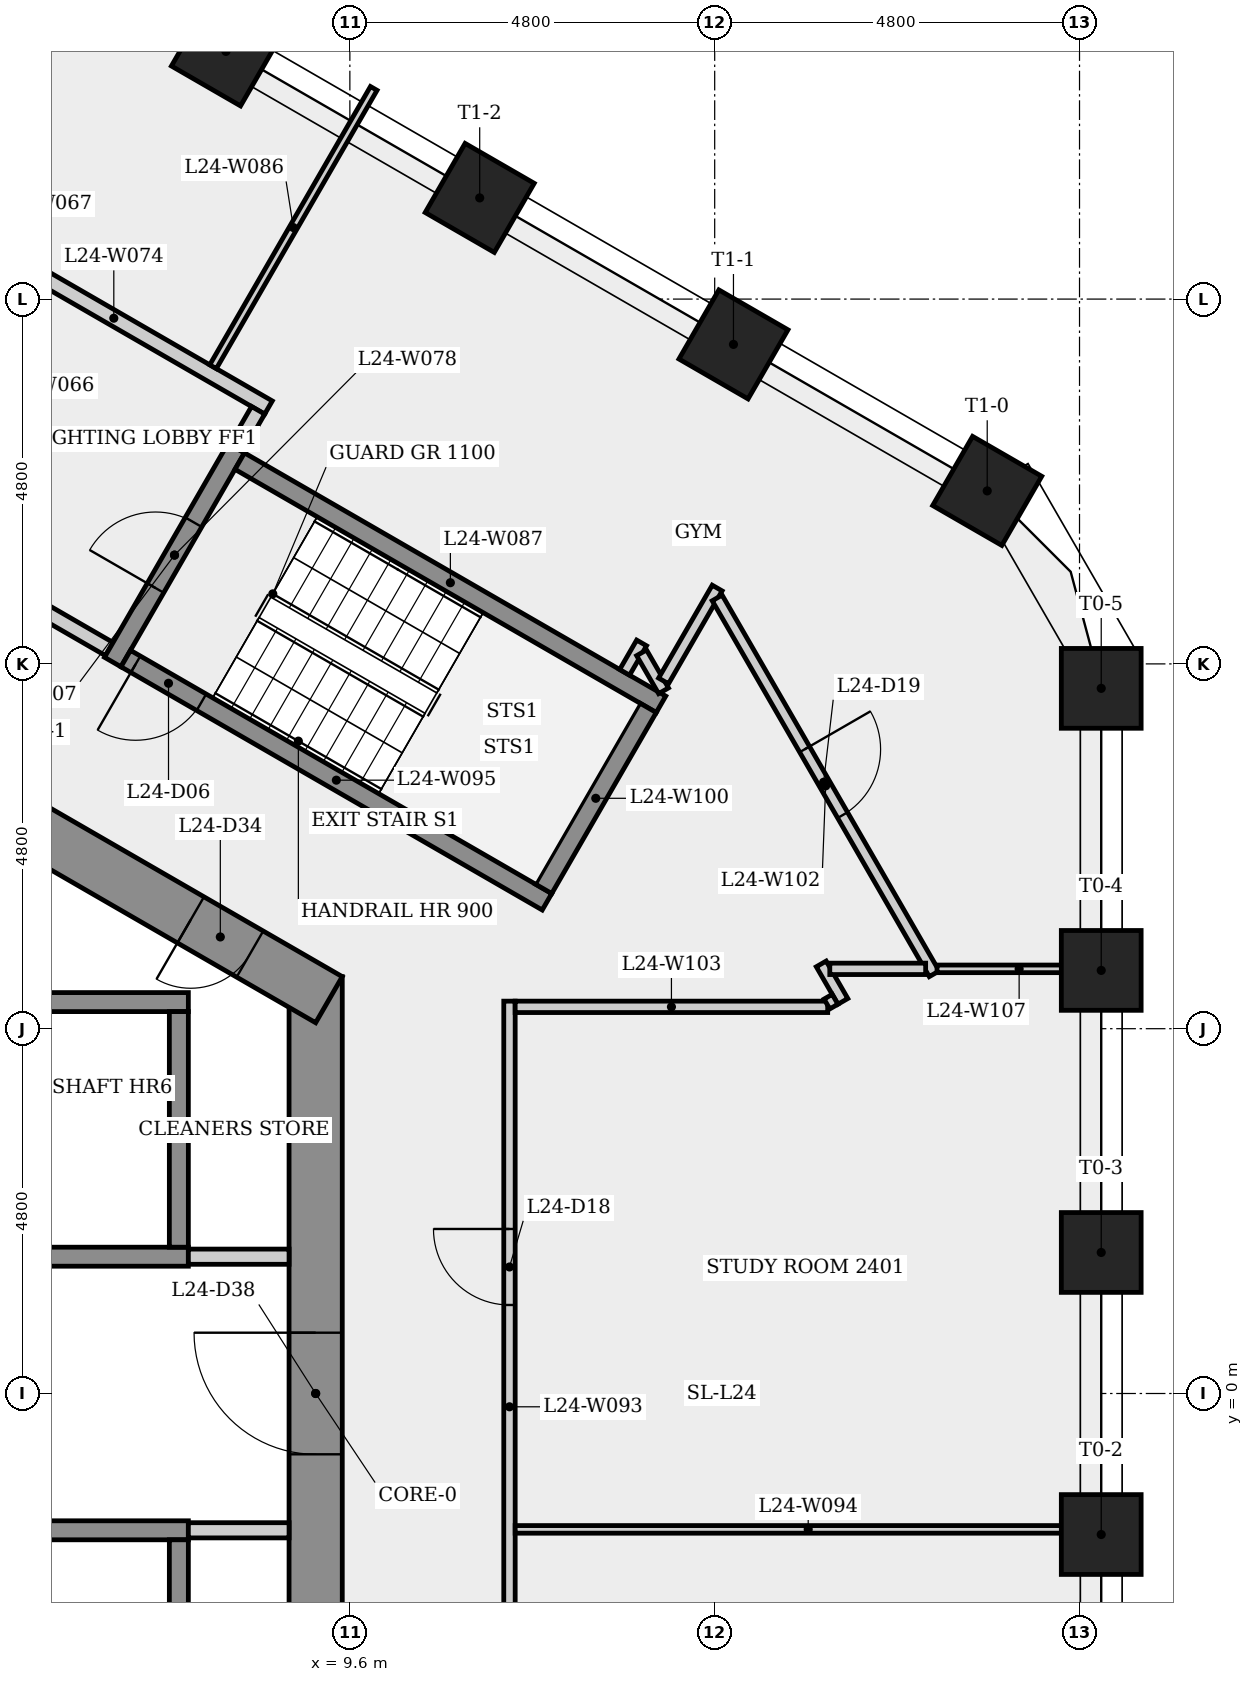
"""IFC4 building model, lengths in metres.
Left out: names, types, materials, properties, quantities, classifications, styles, units other than length and angle.
Written with IfcOpenShell. Run it as: python <this file> out.ifc"""

import sys

from ifc_helpers import new_model, si_unit, direction, frame, frame_2d, origin, origin_2d, place, context, subcontext, project, spatial, rectangle, extrude, element, fill, save


model = new_model("IFC4")
c1 = context("Model", 3, precision=1e-05, world=origin(), true_north=direction((0.0, 1.0)))
c2 = subcontext(c1, "Body", "Model", "MODEL_VIEW")
j1 = project(units=[si_unit("LENGTHUNIT", "METRE"), si_unit("PLANEANGLEUNIT", "RADIAN")], contexts=[c1])
p1 = place(None, origin())
s1 = spatial("IfcSite", under=j1, at=p1, CompositionType="ELEMENT")
p2 = place(p1, origin())
s2 = spatial("IfcBuilding", under=s1, at=p2, CompositionType="ELEMENT")
p3 = place(p2, frame((0.0, 0.0, 93.3)))
s3 = spatial("IfcBuildingStorey", under=s2, at=p3, CompositionType="ELEMENT", Elevation=93.3)
p4 = place(p3, frame((9.15, -5.485, 0.0), z_axis=(0.0, 0.0, 1.0), x_axis=(0.0, 1.0, 0.0)))
e1 = element("IfcWall", 1, at=p4, inside=s3, PredefinedType="SHEAR", context=c2, shape_type="SweptSolid", body=[
    extrude(rectangle(XDim=10.97, YDim=0.7, at=frame_2d((5.485, 0.0))), origin(), (0.0, 0.0, 1.0), 3.4),
])
p5 = place(p4, frame((4.685, 0.0, 0.0)))
e2 = element("IfcOpeningElement", 2, at=p5, cuts=e1, PredefinedType="OPENING", context=c2, shape_type="SweptSolid", body=[
    extrude(rectangle(XDim=1.6, YDim=2.1, at=frame_2d((0.8, 1.05))), frame((0.0, 0.36, 0.0), z_axis=(0.0, -1.0, 0.0), x_axis=(1.0, 0.0, 0.0)), (0.0, 0.0, 1.0), 0.72),
])
p6 = place(p3, frame((9.325, 5.182, 0.0), z_axis=(0.0, 0.0, 1.0), x_axis=(-0.866023993627, 0.500002442456, 0.0)))
e3 = element("IfcWall", 3, at=p6, inside=s3, PredefinedType="SHEAR", context=c2, shape_type="SweptSolid", body=[
    extrude(rectangle(XDim=10.97, YDim=0.7, at=frame_2d((5.485, 0.0))), origin(), (0.0, 0.0, 1.0), 3.4),
])
p7 = place(p6, frame((7.46, 0.0, 0.0)))
e4 = element("IfcOpeningElement", 4, at=p7, cuts=e3, PredefinedType="OPENING", context=c2, shape_type="SweptSolid", body=[
    extrude(rectangle(XDim=0.9, YDim=2.1, at=frame_2d((0.45, 1.05))), frame((0.0, 0.36, 0.0), z_axis=(0.0, -1.0, 0.0), x_axis=(1.0, 0.0, 0.0)), (0.0, 0.0, 1.0), 0.72),
])
p8 = place(p6, frame((1.201, 0.0, 0.0)))
e5 = element("IfcOpeningElement", 5, at=p8, cuts=e3, PredefinedType="OPENING", context=c2, shape_type="SweptSolid", body=[
    extrude(rectangle(XDim=0.9, YDim=2.1, at=frame_2d((0.45, 1.05))), frame((0.0, 0.36, 0.0), z_axis=(0.0, -1.0, 0.0), x_axis=(1.0, 0.0, 0.0)), (0.0, 0.0, 1.0), 0.72),
])
for number, where, z_axis, x_axis in (
    (6, (19.486, -1.856, 0.0), (0.0, 0.0, 1.0), (1.0, 0.0, 0.0)),
    (7, (19.486, 1.856, 0.0), (0.0, 0.0, 1.0), (1.0, 0.0, 0.0)),
    (8, (19.486, 5.567, 0.0), (0.0, 0.0, 1.0), (1.0, 0.0, 0.0)),
    (9, (19.486, 9.278, 0.0), (0.0, 0.0, 1.0), (1.0, 0.0, 0.0)),
    (10, (17.986, 11.876, 0.0), (0.0, 0.0, 1.0), (0.5, 0.866, 0.0)),
    (11, (14.647, 13.804, 0.0), (0.0, 0.0, 1.0), (0.5, 0.866, 0.0)),
    (12, (11.308, 15.731, 0.0), (0.0, 0.0, 1.0), (0.5, 0.866, 0.0)),
    (13, (7.969, 17.659, 0.0), (0.0, 0.0, 1.0), (0.5, 0.866, 0.0)),
):
    element("IfcColumn", number, at=place(p3, frame(where, z_axis=z_axis, x_axis=x_axis)), inside=s3, PredefinedType="COLUMN", context=c2, shape_type="SweptSolid", body=[
        extrude(rectangle(XDim=1.05, YDim=1.05, at=origin_2d()), origin(), (0.0, 0.0, 1.0), 3.4),
    ])
p9 = place(p3, frame((-7.475, 1.8, 0.0), z_axis=(0.0, 0.0, 1.0), x_axis=(1.0, 0.0, 0.0)))
e14 = element("IfcWall", 14, at=p9, inside=s3, PredefinedType="SHEAR", context=c2, shape_type="SweptSolid", body=[
    extrude(rectangle(XDim=14.95, YDim=0.25, at=frame_2d((7.475, 0.0))), origin(), (0.0, 0.0, 1.0), 3.05),
])
p10 = place(p3, frame((-7.225, 5.15, 0.0), z_axis=(0.0, 0.0, 1.0), x_axis=(1.0, 0.0, 0.0)))
e15 = element("IfcWall", 15, at=p10, inside=s3, PredefinedType="SHEAR", context=c2, shape_type="SweptSolid", body=[
    extrude(rectangle(XDim=14.7, YDim=0.25, at=frame_2d((7.35, 0.0))), origin(), (0.0, 0.0, 1.0), 3.05),
])
p11 = place(p3, frame((-7.225, -1.8, 0.0), z_axis=(0.0, 0.0, 1.0), x_axis=(1.0, 0.0, 0.0)))
e16 = element("IfcWall", 16, at=p11, inside=s3, PredefinedType="SHEAR", context=c2, shape_type="SweptSolid", body=[
    extrude(rectangle(XDim=14.7, YDim=0.25, at=frame_2d((7.35, 0.0))), origin(), (0.0, 0.0, 1.0), 3.05),
])
p12 = place(p11, frame((0.597, 0.0, 0.0)))
e17 = element("IfcOpeningElement", 17, at=p12, cuts=e16, PredefinedType="OPENING", context=c2, shape_type="SweptSolid", body=[
    extrude(rectangle(XDim=1.1, YDim=2.1, at=frame_2d((0.55, 1.05))), frame((0.0, 0.135, 0.0), z_axis=(0.0, -1.0, 0.0), x_axis=(1.0, 0.0, 0.0)), (0.0, 0.0, 1.0), 0.27),
])
p13 = place(p11, frame((3.0, 0.0, 0.0)))
e18 = element("IfcOpeningElement", 18, at=p13, cuts=e16, PredefinedType="OPENING", context=c2, shape_type="SweptSolid", body=[
    extrude(rectangle(XDim=1.1, YDim=2.1, at=frame_2d((0.55, 1.05))), frame((0.0, 0.135, 0.0), z_axis=(0.0, -1.0, 0.0), x_axis=(1.0, 0.0, 0.0)), (0.0, 0.0, 1.0), 0.27),
])
p14 = place(p11, frame((5.45, 0.0, 0.0)))
e19 = element("IfcOpeningElement", 19, at=p14, cuts=e16, PredefinedType="OPENING", context=c2, shape_type="SweptSolid", body=[
    extrude(rectangle(XDim=1.1, YDim=2.1, at=frame_2d((0.55, 1.05))), frame((0.0, 0.135, 0.0), z_axis=(0.0, -1.0, 0.0), x_axis=(1.0, 0.0, 0.0)), (0.0, 0.0, 1.0), 0.27),
])
p15 = place(p11, frame((7.9, 0.0, 0.0)))
e20 = element("IfcOpeningElement", 20, at=p15, cuts=e16, PredefinedType="OPENING", context=c2, shape_type="SweptSolid", body=[
    extrude(rectangle(XDim=1.1, YDim=2.1, at=frame_2d((0.55, 1.05))), frame((0.0, 0.135, 0.0), z_axis=(0.0, -1.0, 0.0), x_axis=(1.0, 0.0, 0.0)), (0.0, 0.0, 1.0), 0.27),
])
p16 = place(p11, frame((10.35, 0.0, 0.0)))
e21 = element("IfcOpeningElement", 21, at=p16, cuts=e16, PredefinedType="OPENING", context=c2, shape_type="SweptSolid", body=[
    extrude(rectangle(XDim=1.1, YDim=2.1, at=frame_2d((0.55, 1.05))), frame((0.0, 0.135, 0.0), z_axis=(0.0, -1.0, 0.0), x_axis=(1.0, 0.0, 0.0)), (0.0, 0.0, 1.0), 0.27),
])
p17 = place(p3, frame((4.459, 15.323, 0.0), z_axis=(0.0, 0.0, 1.0), x_axis=(0.866016039709, -0.500016218704, 0.0)))
e22 = element("IfcWall", 22, at=p17, inside=s3, PredefinedType="PARTITIONING", context=c2, shape_type="SweptSolid", body=[
    extrude(rectangle(XDim=4.7, YDim=0.2, at=frame_2d((2.35, 0.0))), origin(), (0.0, 0.0, 1.0), 3.05),
])
p18 = place(p3, frame((6.435, 9.795, 0.0), z_axis=(0.0, 0.0, 1.0), x_axis=(-0.866012907634, 0.500021643343, 0.0)))
e23 = element("IfcWall", 23, at=p18, inside=s3, PredefinedType="PARTITIONING", context=c2, shape_type="SweptSolid", body=[
    extrude(rectangle(XDim=4.45, YDim=0.2, at=frame_2d((2.225, 0.0))), origin(), (0.0, 0.0, 1.0), 3.05),
])
p19 = place(p18, frame((1.675, 0.0, 0.0)))
e24 = element("IfcOpeningElement", 24, at=p19, cuts=e23, PredefinedType="OPENING", context=c2, shape_type="SweptSolid", body=[
    extrude(rectangle(XDim=1.1, YDim=2.1, at=frame_2d((0.55, 1.05))), frame((0.0, 0.11, 0.0), z_axis=(0.0, -1.0, 0.0), x_axis=(1.0, 0.0, 0.0)), (0.0, 0.0, 1.0), 0.22),
])
p20 = place(p3, frame((6.48, 9.624, 0.0), z_axis=(0.0, 0.0, 1.0), x_axis=(0.500017246033, 0.866015446554, 0.0)))
e25 = element("IfcWall", 25, at=p20, inside=s3, PredefinedType="SHEAR", context=c2, shape_type="SweptSolid", body=[
    extrude(rectangle(XDim=3.25, YDim=0.25, at=frame_2d((1.625, 0.0))), origin(), (0.0, 0.0, 1.0), 3.05),
])
p21 = place(p20, frame((1.125, 0.0, 0.0)))
e26 = element("IfcOpeningElement", 26, at=p21, cuts=e25, PredefinedType="OPENING", context=c2, shape_type="SweptSolid", body=[
    extrude(rectangle(XDim=1.0, YDim=2.1, at=frame_2d((0.5, 1.05))), frame((0.0, 0.135, 0.0), z_axis=(0.0, -1.0, 0.0), x_axis=(1.0, 0.0, 0.0)), (0.0, 0.0, 1.0), 0.27),
])
p22 = place(p3, frame((7.475, 1.8, 0.0), z_axis=(0.0, 0.0, 1.0), x_axis=(1.0, 0.0, 0.0)))
e27 = element("IfcWall", 27, at=p22, inside=s3, PredefinedType="PARTITIONING", context=c2, shape_type="SweptSolid", body=[
    extrude(rectangle(XDim=1.325, YDim=0.2, at=frame_2d((0.663, 0.0))), origin(), (0.0, 0.0, 1.0), 3.05),
])
for number, where, z_axis, x_axis in (
    (28, (7.35, -1.925, 0.0), (0.0, 0.0, 1.0), (0.0, -1.0, 0.0)),
    (29, (7.35, 5.025, 0.0), (0.0, 0.0, 1.0), (0.0, -1.0, 0.0)),
):
    element("IfcWall", number, at=place(p3, frame(where, z_axis=z_axis, x_axis=x_axis)), inside=s3, PredefinedType="SHEAR", context=c2, shape_type="SweptSolid", body=[
        extrude(rectangle(XDim=3.1, YDim=0.25, at=frame_2d((1.55, 0.0))), origin(), (0.0, 0.0, 1.0), 3.4),
    ])
p23 = place(p3, frame((7.8, 13.51, 0.0), z_axis=(0.0, 0.0, 1.0), x_axis=(0.499988999718, 0.866031754707, 0.0)))
e30 = element("IfcWall", 30, at=p23, inside=s3, PredefinedType="PARTITIONING", context=c2, shape_type="SweptSolid", body=[
    extrude(rectangle(XDim=4.229, YDim=0.1, at=frame_2d((2.114, 0.0))), origin(), (0.0, 0.0, 1.0), 3.05),
])
p24 = place(p3, frame((8.151, 12.268, 0.0), z_axis=(0.0, 0.0, 1.0), x_axis=(0.866025499775, -0.499999833739, 0.0)))
e31 = element("IfcWall", 31, at=p24, inside=s3, PredefinedType="SHEAR", context=c2, shape_type="SweptSolid", body=[
    extrude(rectangle(XDim=6.4, YDim=0.25, at=frame_2d((3.2, 0.0))), origin(), (0.0, 0.0, 1.0), 3.05),
])
p25 = place(p3, frame((8.393, 12.937, 0.0), z_axis=(0.0, 0.0, 1.0), x_axis=(-0.500065409566, -0.86598763626, 0.0)))
e32 = element("IfcWall", 32, at=p25, inside=s3, PredefinedType="PARTITIONING", context=c2, shape_type="SweptSolid", body=[
    extrude(rectangle(XDim=0.575, YDim=0.2, at=frame_2d((0.288, 0.0))), origin(), (0.0, 0.0, 1.0), 3.05),
])
p26 = place(p3, frame((8.8, -1.8, 0.0), z_axis=(0.0, 0.0, 1.0), x_axis=(-1.0, 0.0, 0.0)))
e33 = element("IfcWall", 33, at=p26, inside=s3, PredefinedType="PARTITIONING", context=c2, shape_type="SweptSolid", body=[
    extrude(rectangle(XDim=1.325, YDim=0.2, at=frame_2d((0.663, 0.0))), origin(), (0.0, 0.0, 1.0), 3.05),
])
p27 = place(p3, frame((11.7, -5.512, 0.0), z_axis=(0.0, 0.0, 1.0), x_axis=(0.0, 1.0, 0.0)))
e34 = element("IfcWall", 34, at=p27, inside=s3, PredefinedType="PARTITIONING", context=c2, shape_type="SweptSolid", body=[
    extrude(rectangle(XDim=10.675, YDim=0.15, at=frame_2d((5.337, 0.0))), origin(), (0.0, 0.0, 1.0), 3.05),
])
p28 = place(p27, frame((6.677, 0.0, 0.0)))
e35 = element("IfcOpeningElement", 35, at=p28, cuts=e34, PredefinedType="OPENING", context=c2, shape_type="SweptSolid", body=[
    extrude(rectangle(XDim=1.0, YDim=2.1, at=frame_2d((0.5, 1.05))), frame((0.0, 0.085, 0.0), z_axis=(0.0, -1.0, 0.0), x_axis=(1.0, 0.0, 0.0)), (0.0, 0.0, 1.0), 0.17),
])
p29 = place(p3, frame((11.775, -1.788, 0.0), z_axis=(0.0, 0.0, 1.0), x_axis=(1.0, 0.0, 0.0)))
e36 = element("IfcWall", 36, at=p29, inside=s3, PredefinedType="PARTITIONING", context=c2, shape_type="SweptSolid", body=[
    extrude(rectangle(XDim=7.711, YDim=0.1, at=frame_2d((3.855, 0.0))), origin(), (0.0, 0.0, 1.0), 3.05),
])
p30 = place(p3, frame((12.194, 6.47, 0.0), z_axis=(0.0, 0.0, 1.0), x_axis=(-0.866025499775, 0.499999833739, 0.0)))
e37 = element("IfcWall", 37, at=p30, inside=s3, PredefinedType="SHEAR", context=c2, shape_type="SweptSolid", body=[
    extrude(rectangle(XDim=6.4, YDim=0.25, at=frame_2d((3.2, 0.0))), origin(), (0.0, 0.0, 1.0), 3.05),
])
p31 = place(p30, frame((5.25, 0.0, 0.0)))
e38 = element("IfcOpeningElement", 38, at=p31, cuts=e37, PredefinedType="OPENING", context=c2, shape_type="SweptSolid", body=[
    extrude(rectangle(XDim=1.0, YDim=2.1, at=frame_2d((0.5, 1.05))), frame((0.0, 0.135, 0.0), z_axis=(0.0, -1.0, 0.0), x_axis=(1.0, 0.0, 0.0)), (0.0, 0.0, 1.0), 0.27),
])
p32 = place(p3, frame((13.215, 9.489, 0.0), z_axis=(0.0, 0.0, 1.0), x_axis=(0.500132045864, 0.865949153646, 0.0)))
e39 = element("IfcWall", 39, at=p32, inside=s3, PredefinedType="PARTITIONING", context=c2, shape_type="SweptSolid", body=[
    extrude(rectangle(XDim=0.447, YDim=0.15, at=frame_2d((0.224, 0.0))), origin(), (0.0, 0.0, 1.0), 3.05),
])
p33 = place(p3, frame((13.438, 9.746, 0.0), z_axis=(0.0, 0.0, 1.0), x_axis=(0.499868889286, -0.866101087359, 0.0)))
e40 = element("IfcWall", 40, at=p33, inside=s3, PredefinedType="PARTITIONING", context=c2, shape_type="SweptSolid", body=[
    extrude(rectangle(XDim=0.577, YDim=0.15, at=frame_2d((0.289, 0.0))), origin(), (0.0, 0.0, 1.0), 3.05),
])
p34 = place(p3, frame((13.523, 9.022, 0.0), z_axis=(0.0, 0.0, 1.0), x_axis=(-0.500034990121, -0.866005201286, 0.0)))
e41 = element("IfcWall", 41, at=p34, inside=s3, PredefinedType="SHEAR", context=c2, shape_type="SweptSolid", body=[
    extrude(rectangle(XDim=2.75, YDim=0.25, at=frame_2d((1.375, 0.0))), origin(), (0.0, 0.0, 1.0), 3.05),
])
p35 = place(p3, frame((13.727, 9.376, 0.0), z_axis=(0.0, 0.0, 1.0), x_axis=(0.499972045304, 0.866041542834, 0.0)))
e42 = element("IfcWall", 42, at=p35, inside=s3, PredefinedType="PARTITIONING", context=c2, shape_type="SweptSolid", body=[
    extrude(rectangle(XDim=1.411, YDim=0.15, at=frame_2d((0.706, 0.0))), origin(), (0.0, 0.0, 1.0), 3.05),
])
p36 = place(p3, frame((14.433, 10.468, 0.0), z_axis=(0.0, 0.0, 1.0), x_axis=(0.500001226279, -0.866024695791, 0.0)))
e43 = element("IfcWall", 43, at=p36, inside=s3, PredefinedType="PARTITIONING", context=c2, shape_type="SweptSolid", body=[
    extrude(rectangle(XDim=5.711, YDim=0.15, at=frame_2d((2.855, 0.0))), origin(), (0.0, 0.0, 1.0), 3.05),
])
p37 = place(p36, frame((2.301, 0.0, 0.0)))
e44 = element("IfcOpeningElement", 44, at=p37, cuts=e43, PredefinedType="OPENING", context=c2, shape_type="SweptSolid", body=[
    extrude(rectangle(XDim=1.0, YDim=2.1, at=frame_2d((0.5, 1.05))), frame((0.0, 0.085, 0.0), z_axis=(0.0, -1.0, 0.0), x_axis=(1.0, 0.0, 0.0)), (0.0, 0.0, 1.0), 0.17),
])
p38 = place(p3, frame((15.887, 5.087, 0.0), z_axis=(0.0, 0.0, 1.0), x_axis=(-1.0, 0.0, 0.0)))
e45 = element("IfcWall", 45, at=p38, inside=s3, PredefinedType="PARTITIONING", context=c2, shape_type="SweptSolid", body=[
    extrude(rectangle(XDim=4.112, YDim=0.15, at=frame_2d((2.056, 0.0))), origin(), (0.0, 0.0, 1.0), 3.05),
])
p39 = place(p3, frame((15.802, 5.652, 0.0), z_axis=(0.0, 0.0, 1.0), x_axis=(0.499784350024, -0.866149873562, 0.0)))
e46 = element("IfcWall", 46, at=p39, inside=s3, PredefinedType="PARTITIONING", context=c2, shape_type="SweptSolid", body=[
    extrude(rectangle(XDim=0.569, YDim=0.15, at=frame_2d((0.285, 0.0))), origin(), (0.0, 0.0, 1.0), 3.05),
])
p40 = place(p3, frame((15.984, 5.187, 0.0), z_axis=(0.0, 0.0, 1.0), x_axis=(-0.865561243632, -0.500803088571, 0.0)))
e47 = element("IfcWall", 47, at=p40, inside=s3, PredefinedType="PARTITIONING", context=c2, shape_type="SweptSolid", body=[
    extrude(rectangle(XDim=0.124, YDim=0.15, at=frame_2d((0.062, 0.0))), origin(), (0.0, 0.0, 1.0), 3.05),
])
p41 = place(p3, frame((17.325, 5.587, 0.0), z_axis=(0.0, 0.0, 1.0), x_axis=(1.0, 0.0, 0.0)))
e48 = element("IfcWall", 48, at=p41, inside=s3, PredefinedType="PARTITIONING", context=c2, shape_type="SweptSolid", body=[
    extrude(rectangle(XDim=2.16, YDim=0.1, at=frame_2d((1.08, 0.0))), origin(), (0.0, 0.0, 1.0), 3.05),
])
p42 = place(p3, frame((17.176, 5.587, 0.0), z_axis=(0.0, 0.0, 1.0), x_axis=(-1.0, 0.0, 0.0)))
e49 = element("IfcWall", 49, at=p42, inside=s3, PredefinedType="PARTITIONING", context=c2, shape_type="SweptSolid", body=[
    extrude(rectangle(XDim=1.261, YDim=0.15, at=frame_2d((0.631, 0.0))), origin(), (0.0, 0.0, 1.0), 3.05),
])
p43 = place(p31, origin())
e50 = element("IfcDoor", 50, at=p43, inside=s3, OperationType="SINGLE_SWING_RIGHT", PredefinedType="DOOR", context=c2, shape_type="SweptSolid", body=[
    extrude(rectangle(XDim=1.0, YDim=2.1, at=frame_2d((0.5, 1.05))), frame((0.0, 0.025, 0.0), z_axis=(0.0, -1.0, 0.0), x_axis=(1.0, 0.0, 0.0)), (0.0, 0.0, 1.0), 0.05),
])
fill(e38, e50)
p44 = place(p21, origin())
e51 = element("IfcDoor", 51, at=p44, inside=s3, OperationType="SINGLE_SWING_LEFT", PredefinedType="DOOR", context=c2, shape_type="SweptSolid", body=[
    extrude(rectangle(XDim=1.0, YDim=2.1, at=frame_2d((0.5, 1.05))), frame((0.0, 0.025, 0.0), z_axis=(0.0, -1.0, 0.0), x_axis=(1.0, 0.0, 0.0)), (0.0, 0.0, 1.0), 0.05),
])
fill(e26, e51)
p45 = place(p28, origin())
e52 = element("IfcDoor", 52, at=p45, inside=s3, OperationType="SINGLE_SWING_RIGHT", PredefinedType="DOOR", context=c2, shape_type="SweptSolid", body=[
    extrude(rectangle(XDim=1.0, YDim=2.1, at=frame_2d((0.5, 1.05))), frame((0.0, 0.025, 0.0), z_axis=(0.0, -1.0, 0.0), x_axis=(1.0, 0.0, 0.0)), (0.0, 0.0, 1.0), 0.05),
])
fill(e35, e52)
p46 = place(p37, origin())
e53 = element("IfcDoor", 53, at=p46, inside=s3, OperationType="SINGLE_SWING_LEFT", PredefinedType="DOOR", context=c2, shape_type="SweptSolid", body=[
    extrude(rectangle(XDim=1.0, YDim=2.1, at=frame_2d((0.5, 1.05))), frame((0.0, 0.025, 0.0), z_axis=(0.0, -1.0, 0.0), x_axis=(1.0, 0.0, 0.0)), (0.0, 0.0, 1.0), 0.05),
])
fill(e44, e53)
p47 = place(p8, origin())
e54 = element("IfcDoor", 54, at=p47, inside=s3, OperationType="SINGLE_SWING_RIGHT", PredefinedType="DOOR", context=c2, shape_type="SweptSolid", body=[
    extrude(rectangle(XDim=0.9, YDim=2.1, at=frame_2d((0.45, 1.05))), frame((0.0, 0.025, 0.0), z_axis=(0.0, -1.0, 0.0), x_axis=(1.0, 0.0, 0.0)), (0.0, 0.0, 1.0), 0.05),
])
fill(e5, e54)
p48 = place(p5, origin())
e55 = element("IfcDoor", 55, at=p48, inside=s3, OperationType="SINGLE_SWING_RIGHT", PredefinedType="DOOR", context=c2, shape_type="SweptSolid", body=[
    extrude(rectangle(XDim=1.6, YDim=2.1, at=frame_2d((0.8, 1.05))), frame((0.0, 0.025, 0.0), z_axis=(0.0, -1.0, 0.0), x_axis=(1.0, 0.0, 0.0)), (0.0, 0.0, 1.0), 0.05),
])
fill(e2, e55)
save(model, sys.argv[1])
